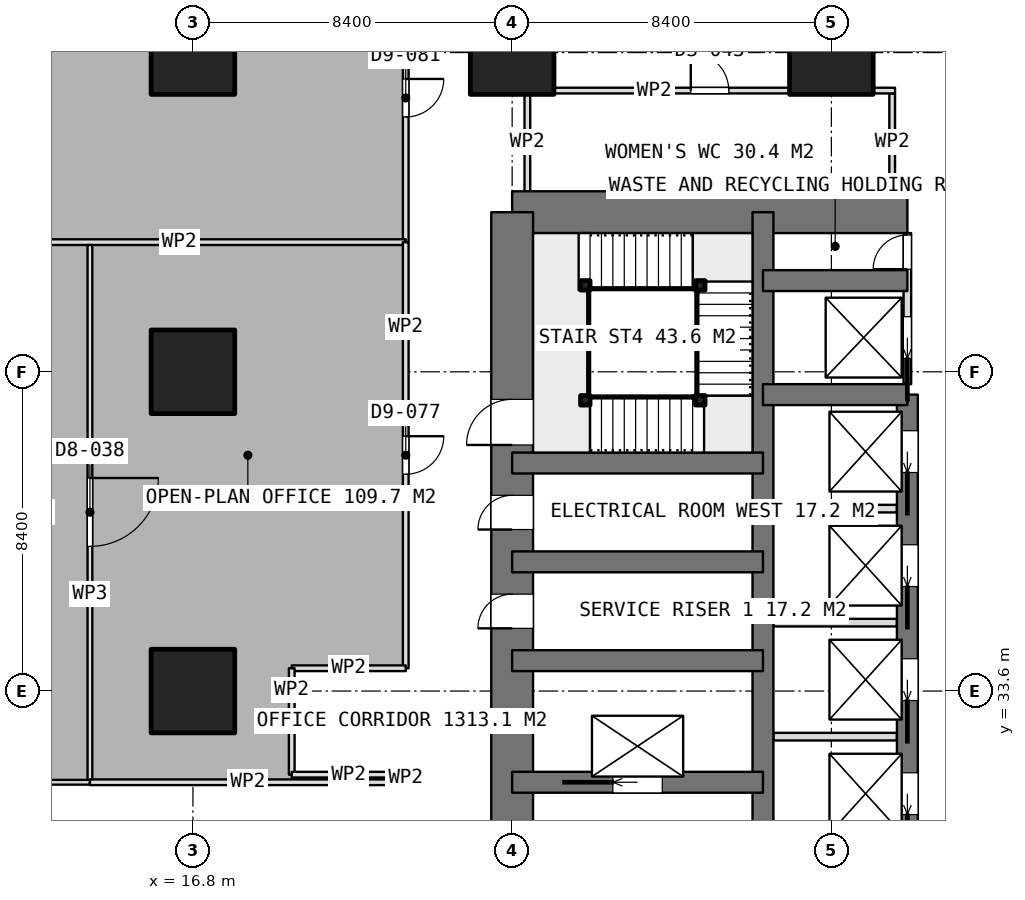
"""IFC4 building model, lengths in metres.
Left out: names, types, materials, properties, quantities, classifications, styles, units other than length and angle.
Written with IfcOpenShell. Run it as: python <this file> out.ifc"""

import sys

from ifc_helpers import new_model, si_unit, direction, frame, frame_2d, origin, origin_2d, place, context, subcontext, project, spatial, rectangle, extrude, element, fill, save


model = new_model("IFC4")
c1 = context("Model", 3, precision=1e-05, world=origin(), true_north=direction((0.0, 1.0)))
c2 = subcontext(c1, "Body", "Model", "MODEL_VIEW")
j1 = project(units=[si_unit("LENGTHUNIT", "METRE"), si_unit("PLANEANGLEUNIT", "RADIAN")], contexts=[c1])
p1 = place(None, origin())
s1 = spatial("IfcSite", under=j1, at=p1, CompositionType="ELEMENT")
p2 = place(p1, origin())
s2 = spatial("IfcBuilding", under=s1, at=p2, CompositionType="ELEMENT")
p3 = place(p2, frame((0.0, 0.0, 36.65)))
s3 = spatial("IfcBuildingStorey", under=s2, at=p3, CompositionType="ELEMENT", Elevation=36.65)
p4 = place(p3, frame((25.2, 46.2, 0.0), z_axis=(0.0, 0.0, 1.0), x_axis=(1.0, 0.0, 0.0)))
e1 = element("IfcWall", 1, at=p4, inside=s3, PredefinedType="SHEAR", context=c2, shape_type="SweptSolid", body=[
    extrude(rectangle(XDim=10.4, YDim=1.1, at=frame_2d((5.2, 0.0))), origin(), (0.0, 0.0, 1.0), 3.75),
])
p5 = place(p3, frame((25.2, 21.0, 0.0), z_axis=(0.0, 0.0, 1.0), x_axis=(0.0, 1.0, 0.0)))
e2 = element("IfcWall", 2, at=p5, inside=s3, PredefinedType="SHEAR", context=c2, shape_type="SweptSolid", body=[
    extrude(rectangle(XDim=25.2, YDim=1.1, at=frame_2d((12.6, 0.0))), origin(), (0.0, 0.0, 1.0), 3.75),
])
p6 = place(p5, frame((7.8, 0.0, 0.0)))
e3 = element("IfcOpeningElement", 3, at=p6, cuts=e2, PredefinedType="OPENING", context=c2, shape_type="SweptSolid", body=[
    extrude(rectangle(XDim=1.2, YDim=2.1, at=frame_2d((0.6, 1.05))), frame((0.0, 0.56, 0.0), z_axis=(0.0, -1.0, 0.0), x_axis=(1.0, 0.0, 0.0)), (0.0, 0.0, 1.0), 1.12),
])
p7 = place(p5, frame((14.25, 0.0, 0.0)))
e4 = element("IfcOpeningElement", 4, at=p7, cuts=e2, PredefinedType="OPENING", context=c2, shape_type="SweptSolid", body=[
    extrude(rectangle(XDim=0.9, YDim=2.1, at=frame_2d((0.45, 1.05))), frame((0.0, 0.56, 0.0), z_axis=(0.0, -1.0, 0.0), x_axis=(1.0, 0.0, 0.0)), (0.0, 0.0, 1.0), 1.12),
])
p8 = place(p5, frame((16.85, 0.0, 0.0)))
e5 = element("IfcOpeningElement", 5, at=p8, cuts=e2, PredefinedType="OPENING", context=c2, shape_type="SweptSolid", body=[
    extrude(rectangle(XDim=0.9, YDim=2.1, at=frame_2d((0.45, 1.05))), frame((0.0, 0.56, 0.0), z_axis=(0.0, -1.0, 0.0), x_axis=(1.0, 0.0, 0.0)), (0.0, 0.0, 1.0), 1.12),
])
p9 = place(p5, frame((19.075, 0.0, 0.0)))
e6 = element("IfcOpeningElement", 6, at=p9, cuts=e2, PredefinedType="OPENING", context=c2, shape_type="SweptSolid", body=[
    extrude(rectangle(XDim=1.2, YDim=2.1, at=frame_2d((0.6, 1.05))), frame((0.0, 0.56, 0.0), z_axis=(0.0, -1.0, 0.0), x_axis=(1.0, 0.0, 0.0)), (0.0, 0.0, 1.0), 1.12),
])
p10 = place(p3, frame((31.8, 21.0, 0.0), z_axis=(0.0, 0.0, 1.0), x_axis=(0.0, 1.0, 0.0)))
e7 = element("IfcWall", 7, at=p10, inside=s3, PredefinedType="SHEAR", context=c2, shape_type="SweptSolid", body=[
    extrude(rectangle(XDim=25.2, YDim=0.55, at=frame_2d((12.6, 0.0))), origin(), (0.0, 0.0, 1.0), 3.75),
])
p11 = place(p3, frame((35.6, 23.4, 0.0), z_axis=(0.0, 0.0, 1.0), x_axis=(0.0, 1.0, 0.0)))
e8 = element("IfcWall", 8, at=p11, inside=s3, PredefinedType="SHEAR", context=c2, shape_type="SweptSolid", body=[
    extrude(rectangle(XDim=18.0, YDim=0.55, at=frame_2d((9.0, 0.0))), origin(), (0.0, 0.0, 1.0), 3.75),
])
p12 = place(p11, frame((0.95, 0.0, 0.0)))
e9 = element("IfcOpeningElement", 9, at=p12, cuts=e8, PredefinedType="OPENING", context=c2, shape_type="SweptSolid", body=[
    extrude(rectangle(XDim=1.1, YDim=2.1, at=frame_2d((0.55, 1.05))), frame((0.0, 0.285, 0.0), z_axis=(0.0, -1.0, 0.0), x_axis=(1.0, 0.0, 0.0)), (0.0, 0.0, 1.0), 0.57),
])
p13 = place(p11, frame((3.95, 0.0, 0.0)))
e10 = element("IfcOpeningElement", 10, at=p13, cuts=e8, PredefinedType="OPENING", context=c2, shape_type="SweptSolid", body=[
    extrude(rectangle(XDim=1.1, YDim=2.1, at=frame_2d((0.55, 1.05))), frame((0.0, 0.285, 0.0), z_axis=(0.0, -1.0, 0.0), x_axis=(1.0, 0.0, 0.0)), (0.0, 0.0, 1.0), 0.57),
])
p14 = place(p11, frame((6.95, 0.0, 0.0)))
e11 = element("IfcOpeningElement", 11, at=p14, cuts=e8, PredefinedType="OPENING", context=c2, shape_type="SweptSolid", body=[
    extrude(rectangle(XDim=1.1, YDim=2.1, at=frame_2d((0.55, 1.05))), frame((0.0, 0.285, 0.0), z_axis=(0.0, -1.0, 0.0), x_axis=(1.0, 0.0, 0.0)), (0.0, 0.0, 1.0), 0.57),
])
p15 = place(p11, frame((9.95, 0.0, 0.0)))
e12 = element("IfcOpeningElement", 12, at=p15, cuts=e8, PredefinedType="OPENING", context=c2, shape_type="SweptSolid", body=[
    extrude(rectangle(XDim=1.1, YDim=2.1, at=frame_2d((0.55, 1.05))), frame((0.0, 0.285, 0.0), z_axis=(0.0, -1.0, 0.0), x_axis=(1.0, 0.0, 0.0)), (0.0, 0.0, 1.0), 0.57),
])
p16 = place(p11, frame((12.95, 0.0, 0.0)))
e13 = element("IfcOpeningElement", 13, at=p16, cuts=e8, PredefinedType="OPENING", context=c2, shape_type="SweptSolid", body=[
    extrude(rectangle(XDim=1.1, YDim=2.1, at=frame_2d((0.55, 1.05))), frame((0.0, 0.285, 0.0), z_axis=(0.0, -1.0, 0.0), x_axis=(1.0, 0.0, 0.0)), (0.0, 0.0, 1.0), 0.57),
])
p17 = place(p11, frame((15.95, 0.0, 0.0)))
e14 = element("IfcOpeningElement", 14, at=p17, cuts=e8, PredefinedType="OPENING", context=c2, shape_type="SweptSolid", body=[
    extrude(rectangle(XDim=1.1, YDim=2.1, at=frame_2d((0.55, 1.05))), frame((0.0, 0.285, 0.0), z_axis=(0.0, -1.0, 0.0), x_axis=(1.0, 0.0, 0.0)), (0.0, 0.0, 1.0), 0.57),
])
for number, where, z_axis, x_axis in (
    (15, (31.8, 41.4, 0.0), (0.0, 0.0, 1.0), (1.0, 0.0, 0.0)),
    (16, (31.8, 44.4, 0.0), (0.0, 0.0, 1.0), (1.0, 0.0, 0.0)),
):
    element("IfcWall", number, at=place(p3, frame(where, z_axis=z_axis, x_axis=x_axis)), inside=s3, PredefinedType="SHEAR", context=c2, shape_type="SweptSolid", body=[
        extrude(rectangle(XDim=3.8, YDim=0.55, at=frame_2d((1.9, 0.0))), origin(), (0.0, 0.0, 1.0), 3.75),
    ])
p18 = place(p3, frame((25.2, 31.2, 0.0), z_axis=(0.0, 0.0, 1.0), x_axis=(1.0, 0.0, 0.0)))
e17 = element("IfcWall", 17, at=p18, inside=s3, PredefinedType="SHEAR", context=c2, shape_type="SweptSolid", body=[
    extrude(rectangle(XDim=6.6, YDim=0.55, at=frame_2d((3.3, 0.0))), origin(), (0.0, 0.0, 1.0), 3.75),
])
p19 = place(p18, frame((2.65, 0.0, 0.0)))
e18 = element("IfcOpeningElement", 18, at=p19, cuts=e17, PredefinedType="OPENING", context=c2, shape_type="SweptSolid", body=[
    extrude(rectangle(XDim=1.3, YDim=2.1, at=frame_2d((0.65, 1.05))), frame((0.0, 0.285, 0.0), z_axis=(0.0, -1.0, 0.0), x_axis=(1.0, 0.0, 0.0)), (0.0, 0.0, 1.0), 0.57),
])
for number, where, z_axis, x_axis in (
    (19, (25.2, 34.4, 0.0), (0.0, 0.0, 1.0), (1.0, 0.0, 0.0)),
    (20, (25.2, 37.0, 0.0), (0.0, 0.0, 1.0), (1.0, 0.0, 0.0)),
    (21, (25.2, 39.6, 0.0), (0.0, 0.0, 1.0), (1.0, 0.0, 0.0)),
):
    element("IfcWall", number, at=place(p3, frame(where, z_axis=z_axis, x_axis=x_axis)), inside=s3, PredefinedType="SHEAR", context=c2, shape_type="SweptSolid", body=[
        extrude(rectangle(XDim=6.6, YDim=0.55, at=frame_2d((3.3, 0.0))), origin(), (0.0, 0.0, 1.0), 3.75),
    ])
for number, where, z_axis, x_axis in (
    (22, (16.8, 33.6, 0.0), (0.0, 0.0, 1.0), (1.0, 0.0, 0.0)),
    (23, (16.8, 42.0, 0.0), (0.0, 0.0, 1.0), (1.0, 0.0, 0.0)),
    (24, (16.8, 50.4, 0.0), (0.0, 0.0, 1.0), (1.0, 0.0, 0.0)),
    (25, (25.2, 50.4, 0.0), (0.0, 0.0, 1.0), (1.0, 0.0, 0.0)),
    (26, (33.6, 50.4, 0.0), (0.0, 0.0, 1.0), (1.0, 0.0, 0.0)),
):
    element("IfcColumn", number, at=place(p3, frame(where, z_axis=z_axis, x_axis=x_axis)), inside=s3, PredefinedType="COLUMN", context=c2, shape_type="SweptSolid", body=[
        extrude(rectangle(XDim=2.2, YDim=2.2, at=origin_2d()), origin(), (0.0, 0.0, 1.0), 3.75),
    ])
for number, where, z_axis, x_axis in (
    (27, (32.075, 32.4, 0.0), (0.0, 0.0, 1.0), (1.0, 0.0, 0.0)),
    (28, (32.075, 35.4, 0.0), (0.0, 0.0, 1.0), (1.0, 0.0, 0.0)),
    (29, (32.075, 38.4, 0.0), (0.0, 0.0, 1.0), (1.0, 0.0, 0.0)),
):
    element("IfcWall", number, at=place(p3, frame(where, z_axis=z_axis, x_axis=x_axis)), inside=s3, PredefinedType="PARTITIONING", context=c2, shape_type="SweptSolid", body=[
        extrude(rectangle(XDim=3.25, YDim=0.2, at=frame_2d((1.625, 0.0))), origin(), (0.0, 0.0, 1.0), 3.5),
    ])
p20 = place(p3, frame((35.6, 41.675, 0.0), z_axis=(0.0, 0.0, 1.0), x_axis=(0.0, 1.0, 0.0)))
e30 = element("IfcWall", 30, at=p20, inside=s3, PredefinedType="PARTITIONING", context=c2, shape_type="SweptSolid", body=[
    extrude(rectangle(XDim=3.975, YDim=0.2, at=frame_2d((1.987, 0.0))), origin(), (0.0, 0.0, 1.0), 3.5),
])
p21 = place(p20, frame((3.025, 0.0, 0.0)))
e31 = element("IfcOpeningElement", 31, at=p21, cuts=e30, PredefinedType="OPENING", context=c2, shape_type="SweptSolid", body=[
    extrude(rectangle(XDim=0.9, YDim=2.1, at=frame_2d((0.45, 1.05))), frame((0.0, 0.11, 0.0), z_axis=(0.0, -1.0, 0.0), x_axis=(1.0, 0.0, 0.0)), (0.0, 0.0, 1.0), 0.22),
])
p22 = place(p20, frame((0.675, 0.0, 0.0)))
e32 = element("IfcOpeningElement", 32, at=p22, cuts=e30, PredefinedType="OPENING", context=c2, shape_type="SweptSolid", body=[
    extrude(rectangle(XDim=1.1, YDim=2.1, at=frame_2d((0.55, 1.05))), frame((0.0, 0.11, 0.0), z_axis=(0.0, -1.0, 0.0), x_axis=(1.0, 0.0, 0.0)), (0.0, 0.0, 1.0), 0.22),
])
p23 = place(p3, frame((25.525, 49.4, 0.0), z_axis=(0.0, 0.0, 1.0), x_axis=(1.0, 0.0, 0.0)))
e33 = element("IfcWall", 33, at=p23, inside=s3, PredefinedType="PARTITIONING", context=c2, shape_type="SweptSolid", body=[
    extrude(rectangle(XDim=9.75, YDim=0.15, at=frame_2d((4.875, 0.0))), origin(), (0.0, 0.0, 1.0), 3.5),
])
p24 = place(p23, frame((4.375, 0.0, 0.0)))
e34 = element("IfcOpeningElement", 34, at=p24, cuts=e33, PredefinedType="OPENING", context=c2, shape_type="SweptSolid", body=[
    extrude(rectangle(XDim=1.0, YDim=2.1, at=frame_2d((0.5, 1.05))), frame((0.0, 0.085, 0.0), z_axis=(0.0, -1.0, 0.0), x_axis=(1.0, 0.0, 0.0)), (0.0, 0.0, 1.0), 0.17),
])
for number, where, z_axis, x_axis in (
    (35, (25.6, 46.75, 0.0), (0.0, 0.0, 1.0), (0.0, 1.0, 0.0)),
    (36, (35.2, 46.75, 0.0), (0.0, 0.0, 1.0), (0.0, 1.0, 0.0)),
):
    element("IfcWall", number, at=place(p3, frame(where, z_axis=z_axis, x_axis=x_axis)), inside=s3, PredefinedType="PARTITIONING", context=c2, shape_type="SweptSolid", body=[
        extrude(rectangle(XDim=2.575, YDim=0.15, at=frame_2d((1.288, 0.0))), origin(), (0.0, 0.0, 1.0), 3.5),
    ])
p25 = place(p3, frame((22.4, 53.0, 0.0), z_axis=(0.0, 0.0, 1.0), x_axis=(0.0, -1.0, 0.0)))
e37 = element("IfcWall", 37, at=p25, inside=s3, PredefinedType="PARTITIONING", context=c2, shape_type="SweptSolid", body=[
    extrude(rectangle(XDim=7.588, YDim=0.15, at=frame_2d((3.794, 0.0))), origin(), (0.0, 0.0, 1.0), 3.5),
])
p26 = place(p25, frame((3.294, 0.0, 0.0)))
e38 = element("IfcOpeningElement", 38, at=p26, cuts=e37, PredefinedType="OPENING", context=c2, shape_type="SweptSolid", body=[
    extrude(rectangle(XDim=1.0, YDim=2.1, at=frame_2d((0.5, 1.05))), frame((0.0, 0.085, 0.0), z_axis=(0.0, -1.0, 0.0), x_axis=(1.0, 0.0, 0.0)), (0.0, 0.0, 1.0), 0.17),
])
p27 = place(p3, frame((22.4, 45.412, 0.0), z_axis=(0.0, 0.0, 1.0), x_axis=(-1.0, 0.0, 0.0)))
e39 = element("IfcWall", 39, at=p27, inside=s3, PredefinedType="PARTITIONING", context=c2, shape_type="SweptSolid", body=[
    extrude(rectangle(XDim=11.912, YDim=0.15, at=frame_2d((5.956, 0.0))), origin(), (0.0, 0.0, 1.0), 3.5),
])
p28 = place(p3, frame((14.09, 45.337, 0.0), z_axis=(0.0, 0.0, 1.0), x_axis=(0.0, -1.0, 0.0)))
e40 = element("IfcWall", 40, at=p28, inside=s3, PredefinedType="PARTITIONING", context=c2, shape_type="SweptSolid", body=[
    extrude(rectangle(XDim=14.137, YDim=0.125, at=frame_2d((7.068, 0.0))), origin(), (0.0, 0.0, 1.0), 3.5),
])
p29 = place(p28, frame((6.131, 0.0, 0.0)))
e41 = element("IfcOpeningElement", 41, at=p29, cuts=e40, PredefinedType="OPENING", context=c2, shape_type="SweptSolid", body=[
    extrude(rectangle(XDim=1.8, YDim=2.1, at=frame_2d((0.9, 1.05))), frame((0.0, 0.073, 0.0), z_axis=(0.0, -1.0, 0.0), x_axis=(1.0, 0.0, 0.0)), (0.0, 0.0, 1.0), 0.145),
])
p30 = place(p3, frame((14.09, 31.2, 0.0), z_axis=(0.0, 0.0, 1.0), x_axis=(-1.0, 0.0, 0.0)))
e42 = element("IfcWall", 42, at=p30, inside=s3, PredefinedType="PARTITIONING", context=c2, shape_type="SweptSolid", body=[
    extrude(rectangle(XDim=7.455, YDim=0.125, at=frame_2d((3.728, 0.0))), origin(), (0.0, 0.0, 1.0), 3.5),
])
p31 = place(p3, frame((22.4, 31.4, 0.0), z_axis=(0.0, 0.0, 1.0), x_axis=(0.0, -1.0, 0.0)))
e43 = element("IfcWall", 43, at=p31, inside=s3, PredefinedType="PARTITIONING", context=c2, shape_type="SweptSolid", body=[
    extrude(rectangle(XDim=0.2, YDim=0.15, at=frame_2d((0.1, 0.0))), origin(), (0.0, 0.0, 1.0), 3.5),
])
p32 = place(p3, frame((22.4, 31.2, 0.0), z_axis=(0.0, 0.0, 1.0), x_axis=(-1.0, 0.0, 0.0)))
e44 = element("IfcWall", 44, at=p32, inside=s3, PredefinedType="PARTITIONING", context=c2, shape_type="SweptSolid", body=[
    extrude(rectangle(XDim=8.31, YDim=0.15, at=frame_2d((4.155, 0.0))), origin(), (0.0, 0.0, 1.0), 3.5),
])
p33 = place(p3, frame((22.4, 45.411, 0.0), z_axis=(0.0, 0.0, 1.0), x_axis=(0.0, -1.0, 0.0)))
e45 = element("IfcWall", 45, at=p33, inside=s3, PredefinedType="PARTITIONING", context=c2, shape_type="SweptSolid", body=[
    extrude(rectangle(XDim=11.211, YDim=0.15, at=frame_2d((5.605, 0.0))), origin(), (0.0, 0.0, 1.0), 3.5),
])
p34 = place(p33, frame((5.105, 0.0, 0.0)))
e46 = element("IfcOpeningElement", 46, at=p34, cuts=e45, PredefinedType="OPENING", context=c2, shape_type="SweptSolid", body=[
    extrude(rectangle(XDim=1.0, YDim=2.1, at=frame_2d((0.5, 1.05))), frame((0.0, 0.085, 0.0), z_axis=(0.0, -1.0, 0.0), x_axis=(1.0, 0.0, 0.0)), (0.0, 0.0, 1.0), 0.17),
])
p35 = place(p3, frame((22.4, 34.2, 0.0), z_axis=(0.0, 0.0, 1.0), x_axis=(-1.0, 0.0, 0.0)))
e47 = element("IfcWall", 47, at=p35, inside=s3, PredefinedType="PARTITIONING", context=c2, shape_type="SweptSolid", body=[
    extrude(rectangle(XDim=3.0, YDim=0.15, at=frame_2d((1.5, 0.0))), origin(), (0.0, 0.0, 1.0), 3.5),
])
p36 = place(p3, frame((19.4, 34.2, 0.0), z_axis=(0.0, 0.0, 1.0), x_axis=(0.0, -1.0, 0.0)))
e48 = element("IfcWall", 48, at=p36, inside=s3, PredefinedType="PARTITIONING", context=c2, shape_type="SweptSolid", body=[
    extrude(rectangle(XDim=2.8, YDim=0.15, at=frame_2d((1.4, 0.0))), origin(), (0.0, 0.0, 1.0), 3.5),
])
p37 = place(p3, frame((19.4, 31.4, 0.0), z_axis=(0.0, 0.0, 1.0), x_axis=(1.0, 0.0, 0.0)))
e49 = element("IfcWall", 49, at=p37, inside=s3, PredefinedType="PARTITIONING", context=c2, shape_type="SweptSolid", body=[
    extrude(rectangle(XDim=3.0, YDim=0.15, at=frame_2d((1.5, 0.0))), origin(), (0.0, 0.0, 1.0), 3.5),
])
for number, where, z_axis, x_axis in (
    (50, (27.125, 41.25, 0.0), (0.0, 0.0, 1.0), (1.0, 0.0, 0.0)),
    (51, (30.15, 41.25, 0.0), (0.0, 0.0, 1.0), (1.0, 0.0, 0.0)),
    (52, (30.15, 44.275, 0.0), (0.0, 0.0, 1.0), (1.0, 0.0, 0.0)),
    (53, (27.125, 44.275, 0.0), (0.0, 0.0, 1.0), (1.0, 0.0, 0.0)),
):
    element("IfcColumn", number, at=place(p3, frame(where, z_axis=z_axis, x_axis=x_axis)), inside=s3, PredefinedType="COLUMN", context=c2, shape_type="SweptSolid", body=[
        extrude(rectangle(XDim=0.25, YDim=0.25, at=origin_2d()), origin(), (0.0, 0.0, 1.0), 3.75),
    ])
p38 = place(p7, origin())
e54 = element("IfcDoor", 54, at=p38, inside=s3, OperationType="SINGLE_SWING_LEFT", PredefinedType="DOOR", context=c2, shape_type="SweptSolid", body=[
    extrude(rectangle(XDim=0.9, YDim=2.1, at=frame_2d((0.45, 1.05))), frame((0.0, 0.025, 0.0), z_axis=(0.0, -1.0, 0.0), x_axis=(1.0, 0.0, 0.0)), (0.0, 0.0, 1.0), 0.05),
])
fill(e4, e54)
p39 = place(p8, origin())
e55 = element("IfcDoor", 55, at=p39, inside=s3, OperationType="SINGLE_SWING_LEFT", PredefinedType="DOOR", context=c2, shape_type="SweptSolid", body=[
    extrude(rectangle(XDim=0.9, YDim=2.1, at=frame_2d((0.45, 1.05))), frame((0.0, 0.025, 0.0), z_axis=(0.0, -1.0, 0.0), x_axis=(1.0, 0.0, 0.0)), (0.0, 0.0, 1.0), 0.05),
])
fill(e5, e55)
p40 = place(p21, origin())
e56 = element("IfcDoor", 56, at=p40, inside=s3, OperationType="SINGLE_SWING_LEFT", PredefinedType="DOOR", context=c2, shape_type="SweptSolid", body=[
    extrude(rectangle(XDim=0.9, YDim=2.1, at=frame_2d((0.45, 1.05))), frame((0.0, 0.025, 0.0), z_axis=(0.0, -1.0, 0.0), x_axis=(1.0, 0.0, 0.0)), (0.0, 0.0, 1.0), 0.05),
])
fill(e31, e56)
p41 = place(p14, origin())
e57 = element("IfcDoor", 57, at=p41, inside=s3, OperationType="SLIDING_TO_LEFT", PredefinedType="USERDEFINED", context=c2, shape_type="SweptSolid", body=[
    extrude(rectangle(XDim=1.1, YDim=2.1, at=frame_2d((0.55, 1.05))), frame((0.0, 0.025, 0.0), z_axis=(0.0, -1.0, 0.0), x_axis=(1.0, 0.0, 0.0)), (0.0, 0.0, 1.0), 0.05),
])
fill(e11, e57)
p42 = place(p15, origin())
e58 = element("IfcDoor", 58, at=p42, inside=s3, OperationType="SLIDING_TO_LEFT", PredefinedType="USERDEFINED", context=c2, shape_type="SweptSolid", body=[
    extrude(rectangle(XDim=1.1, YDim=2.1, at=frame_2d((0.55, 1.05))), frame((0.0, 0.025, 0.0), z_axis=(0.0, -1.0, 0.0), x_axis=(1.0, 0.0, 0.0)), (0.0, 0.0, 1.0), 0.05),
])
fill(e12, e58)
p43 = place(p16, origin())
e59 = element("IfcDoor", 59, at=p43, inside=s3, OperationType="SLIDING_TO_LEFT", PredefinedType="USERDEFINED", context=c2, shape_type="SweptSolid", body=[
    extrude(rectangle(XDim=1.1, YDim=2.1, at=frame_2d((0.55, 1.05))), frame((0.0, 0.025, 0.0), z_axis=(0.0, -1.0, 0.0), x_axis=(1.0, 0.0, 0.0)), (0.0, 0.0, 1.0), 0.05),
])
fill(e13, e59)
p44 = place(p17, origin())
e60 = element("IfcDoor", 60, at=p44, inside=s3, OperationType="SLIDING_TO_LEFT", PredefinedType="USERDEFINED", context=c2, shape_type="SweptSolid", body=[
    extrude(rectangle(XDim=1.1, YDim=2.1, at=frame_2d((0.55, 1.05))), frame((0.0, 0.025, 0.0), z_axis=(0.0, -1.0, 0.0), x_axis=(1.0, 0.0, 0.0)), (0.0, 0.0, 1.0), 0.05),
])
fill(e14, e60)
p45 = place(p19, origin())
e61 = element("IfcDoor", 61, at=p45, inside=s3, OperationType="SLIDING_TO_LEFT", PredefinedType="USERDEFINED", context=c2, shape_type="SweptSolid", body=[
    extrude(rectangle(XDim=1.3, YDim=2.1, at=frame_2d((0.65, 1.05))), frame((0.0, 0.025, 0.0), z_axis=(0.0, -1.0, 0.0), x_axis=(1.0, 0.0, 0.0)), (0.0, 0.0, 1.0), 0.05),
])
fill(e18, e61)
p46 = place(p22, origin())
e62 = element("IfcDoor", 62, at=p46, inside=s3, OperationType="SLIDING_TO_LEFT", PredefinedType="USERDEFINED", context=c2, shape_type="SweptSolid", body=[
    extrude(rectangle(XDim=1.1, YDim=2.1, at=frame_2d((0.55, 1.05))), frame((0.0, 0.025, 0.0), z_axis=(0.0, -1.0, 0.0), x_axis=(1.0, 0.0, 0.0)), (0.0, 0.0, 1.0), 0.05),
])
fill(e32, e62)
p47 = place(p24, origin())
e63 = element("IfcDoor", 63, at=p47, inside=s3, OperationType="SINGLE_SWING_LEFT", PredefinedType="DOOR", context=c2, shape_type="SweptSolid", body=[
    extrude(rectangle(XDim=1.0, YDim=2.1, at=frame_2d((0.5, 1.05))), frame((0.0, 0.025, 0.0), z_axis=(0.0, -1.0, 0.0), x_axis=(1.0, 0.0, 0.0)), (0.0, 0.0, 1.0), 0.05),
])
fill(e34, e63)
p48 = place(p26, origin())
e64 = element("IfcDoor", 64, at=p48, inside=s3, OperationType="SINGLE_SWING_LEFT", PredefinedType="DOOR", context=c2, shape_type="SweptSolid", body=[
    extrude(rectangle(XDim=1.0, YDim=2.1, at=frame_2d((0.5, 1.05))), frame((0.0, 0.025, 0.0), z_axis=(0.0, -1.0, 0.0), x_axis=(1.0, 0.0, 0.0)), (0.0, 0.0, 1.0), 0.05),
])
fill(e38, e64)
p49 = place(p29, origin())
e65 = element("IfcDoor", 65, at=p49, inside=s3, OperationType="DOUBLE_DOOR_SINGLE_SWING", PredefinedType="DOOR", context=c2, shape_type="SweptSolid", body=[
    extrude(rectangle(XDim=1.8, YDim=2.1, at=frame_2d((0.9, 1.05))), frame((0.0, 0.025, 0.0), z_axis=(0.0, -1.0, 0.0), x_axis=(1.0, 0.0, 0.0)), (0.0, 0.0, 1.0), 0.05),
])
fill(e41, e65)
p50 = place(p34, origin())
e66 = element("IfcDoor", 66, at=p50, inside=s3, OperationType="SINGLE_SWING_LEFT", PredefinedType="DOOR", context=c2, shape_type="SweptSolid", body=[
    extrude(rectangle(XDim=1.0, YDim=2.1, at=frame_2d((0.5, 1.05))), frame((0.0, 0.025, 0.0), z_axis=(0.0, -1.0, 0.0), x_axis=(1.0, 0.0, 0.0)), (0.0, 0.0, 1.0), 0.05),
])
fill(e46, e66)
p51 = place(p9, origin())
e67 = element("IfcDoor", 67, at=p51, inside=s3, OperationType="SINGLE_SWING_RIGHT", PredefinedType="DOOR", context=c2, shape_type="SweptSolid", body=[
    extrude(rectangle(XDim=1.2, YDim=2.1, at=frame_2d((0.6, 1.05))), frame((0.0, 0.025, 0.0), z_axis=(0.0, -1.0, 0.0), x_axis=(1.0, 0.0, 0.0)), (0.0, 0.0, 1.0), 0.05),
])
fill(e6, e67)
save(model, sys.argv[1])
